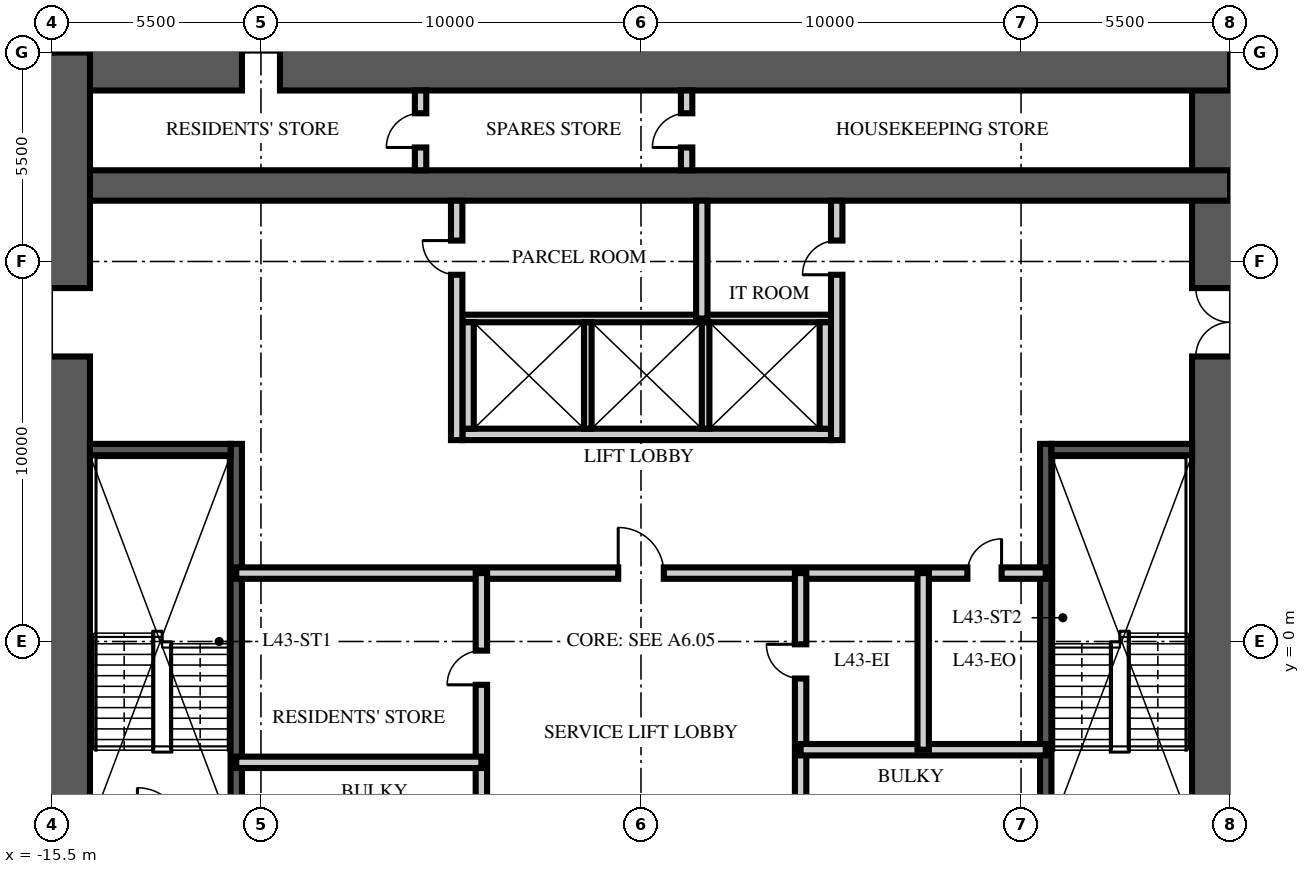
"""IFC4 building model, lengths in metres.
Left out: names, types, materials, properties, quantities, classifications, styles, units other than length and angle.
Written with IfcOpenShell. Run it as: python <this file> out.ifc"""

import sys

from ifc_helpers import new_model, si_unit, direction, frame, frame_2d, origin, place, context, subcontext, project, spatial, rectangle, extrude, element, fill, save


model = new_model("IFC4")
c1 = context("Model", 3, precision=1e-05, world=origin(), true_north=direction((0.0, 1.0)))
c2 = subcontext(c1, "Body", "Model", "MODEL_VIEW")
j1 = project(units=[si_unit("LENGTHUNIT", "METRE"), si_unit("PLANEANGLEUNIT", "RADIAN")], contexts=[c1])
p1 = place(None, origin())
s1 = spatial("IfcSite", under=j1, at=p1, CompositionType="ELEMENT")
p2 = place(p1, origin())
s2 = spatial("IfcBuilding", under=s1, at=p2, CompositionType="ELEMENT")
p3 = place(p2, frame((0.0, 0.0, 171.0)))
s3 = spatial("IfcBuildingStorey", under=s2, at=p3, CompositionType="ELEMENT", Elevation=171.0)
p4 = place(p3, frame((15.5, -15.5, -0.25), z_axis=(0.0, 0.0, 1.0), x_axis=(0.0, 1.0, 0.0)))
e1 = element("IfcWall", 1, at=p4, inside=s3, PredefinedType="SHEAR", context=c2, shape_type="SweptSolid", body=[
    extrude(rectangle(XDim=31.0, YDim=2.0, at=frame_2d((15.5, 0.0))), origin(), (0.0, 0.0, 1.0), 3.75),
])
p5 = place(p4, frame((6.5, 0.0, 0.25)))
e2 = element("IfcOpeningElement", 2, at=p5, cuts=e1, PredefinedType="OPENING", context=c2, shape_type="SweptSolid", body=[
    extrude(rectangle(XDim=1.2, YDim=2.1, at=frame_2d((0.6, 1.05))), frame((0.0, 1.01, 0.0), z_axis=(0.0, -1.0, 0.0), x_axis=(1.0, 0.0, 0.0)), (0.0, 0.0, 1.0), 2.02),
])
p6 = place(p4, frame((23.0, 0.0, 0.25)))
e3 = element("IfcOpeningElement", 3, at=p6, cuts=e1, PredefinedType="OPENING", context=c2, shape_type="SweptSolid", body=[
    extrude(rectangle(XDim=1.8, YDim=2.1, at=frame_2d((0.9, 1.05))), frame((0.0, 1.01, 0.0), z_axis=(0.0, -1.0, 0.0), x_axis=(1.0, 0.0, 0.0)), (0.0, 0.0, 1.0), 2.02),
])
p7 = place(p3, frame((-15.5, 15.5, -0.25), z_axis=(0.0, 0.0, 1.0), x_axis=(1.0, 0.0, 0.0)))
e4 = element("IfcWall", 4, at=p7, inside=s3, PredefinedType="SHEAR", context=c2, shape_type="SweptSolid", body=[
    extrude(rectangle(XDim=31.0, YDim=2.0, at=frame_2d((15.5, 0.0))), origin(), (0.0, 0.0, 1.0), 3.75),
])
p8 = place(p7, frame((5.0, 0.0, 0.25)))
e5 = element("IfcOpeningElement", 5, at=p8, cuts=e4, PredefinedType="OPENING", context=c2, shape_type="SweptSolid", body=[
    extrude(rectangle(XDim=1.0, YDim=2.1, at=frame_2d((0.5, 1.05))), frame((0.0, 1.01, 0.0), z_axis=(0.0, -1.0, 0.0), x_axis=(1.0, 0.0, 0.0)), (0.0, 0.0, 1.0), 2.02),
])
p9 = place(p3, frame((-15.5, 12.0, -0.25), z_axis=(0.0, 0.0, 1.0), x_axis=(1.0, 0.0, 0.0)))
e6 = element("IfcWall", 6, at=p9, inside=s3, PredefinedType="SHEAR", context=c2, shape_type="SweptSolid", body=[
    extrude(rectangle(XDim=31.0, YDim=0.8, at=frame_2d((15.5, 0.0))), origin(), (0.0, 0.0, 1.0), 3.75),
])
p10 = place(p3, frame((-15.5, -15.5, -0.25), z_axis=(0.0, 0.0, 1.0), x_axis=(0.0, 1.0, 0.0)))
e7 = element("IfcWall", 7, at=p10, inside=s3, PredefinedType="SHEAR", context=c2, shape_type="SweptSolid", body=[
    extrude(rectangle(XDim=31.0, YDim=2.0, at=frame_2d((15.5, 0.0))), origin(), (0.0, 0.0, 1.0), 3.75),
])
p11 = place(p10, frame((6.5, 0.0, 0.25)))
e8 = element("IfcOpeningElement", 8, at=p11, cuts=e7, PredefinedType="OPENING", context=c2, shape_type="SweptSolid", body=[
    extrude(rectangle(XDim=1.2, YDim=2.1, at=frame_2d((0.6, 1.05))), frame((0.0, 1.01, 0.0), z_axis=(0.0, -1.0, 0.0), x_axis=(1.0, 0.0, 0.0)), (0.0, 0.0, 1.0), 2.02),
])
p12 = place(p10, frame((23.0, 0.0, 0.25)))
e9 = element("IfcOpeningElement", 9, at=p12, cuts=e7, PredefinedType="OPENING", context=c2, shape_type="SweptSolid", body=[
    extrude(rectangle(XDim=1.8, YDim=2.1, at=frame_2d((0.9, 1.05))), frame((0.0, 1.01, 0.0), z_axis=(0.0, -1.0, 0.0), x_axis=(1.0, 0.0, 0.0)), (0.0, 0.0, 1.0), 2.02),
])
p13 = place(p3, frame((-10.65, -4.9, 0.0), z_axis=(0.0, 0.0, 1.0), x_axis=(0.0, 1.0, 0.0)))
e10 = element("IfcWall", 10, at=p13, inside=s3, PredefinedType="SOLIDWALL", context=c2, shape_type="SweptSolid", body=[
    extrude(rectangle(XDim=10.1, YDim=0.3, at=frame_2d((5.05, 0.0))), origin(), (0.0, 0.0, 1.0), 3.5),
])
p14 = place(p3, frame((-14.5, 5.05, 0.0), z_axis=(0.0, 0.0, 1.0), x_axis=(1.0, 0.0, 0.0)))
e11 = element("IfcWall", 11, at=p14, inside=s3, PredefinedType="SOLIDWALL", context=c2, shape_type="SweptSolid", body=[
    extrude(rectangle(XDim=3.7, YDim=0.3, at=frame_2d((1.85, 0.0))), origin(), (0.0, 0.0, 1.0), 3.5),
])
p15 = place(p3, frame((10.65, -4.9, 0.0), z_axis=(0.0, 0.0, 1.0), x_axis=(0.0, 1.0, 0.0)))
e12 = element("IfcWall", 12, at=p15, inside=s3, PredefinedType="SOLIDWALL", context=c2, shape_type="SweptSolid", body=[
    extrude(rectangle(XDim=10.1, YDim=0.3, at=frame_2d((5.05, 0.0))), origin(), (0.0, 0.0, 1.0), 3.5),
])
p16 = place(p3, frame((14.5, 5.05, 0.0), z_axis=(0.0, 0.0, 1.0), x_axis=(-1.0, 0.0, 0.0)))
e13 = element("IfcWall", 13, at=p16, inside=s3, PredefinedType="SOLIDWALL", context=c2, shape_type="SweptSolid", body=[
    extrude(rectangle(XDim=3.7, YDim=0.3, at=frame_2d((1.85, 0.0))), origin(), (0.0, 0.0, 1.0), 3.5),
])
p17 = place(p3, frame((-4.7, 5.45, 0.0), z_axis=(0.0, 0.0, 1.0), x_axis=(1.0, 0.0, 0.0)))
e14 = element("IfcWall", 14, at=p17, inside=s3, PredefinedType="PARTITIONING", context=c2, shape_type="SweptSolid", body=[
    extrude(rectangle(XDim=9.7, YDim=0.3, at=frame_2d((4.85, 0.0))), origin(), (0.0, 0.0, 1.0), 3.5),
])
p18 = place(p3, frame((-4.7, 8.5, 0.0), z_axis=(0.0, 0.0, 1.0), x_axis=(1.0, 0.0, 0.0)))
e15 = element("IfcWall", 15, at=p18, inside=s3, PredefinedType="PARTITIONING", context=c2, shape_type="SweptSolid", body=[
    extrude(rectangle(XDim=9.7, YDim=0.2, at=frame_2d((4.85, 0.0))), origin(), (0.0, 0.0, 1.0), 3.5),
])
for number, where, z_axis, x_axis in (
    (16, (-4.55, 5.6, 0.0), (0.0, 0.0, 1.0), (0.0, 1.0, 0.0)),
    (17, (4.85, 5.6, 0.0), (0.0, 0.0, 1.0), (0.0, 1.0, 0.0)),
):
    element("IfcWall", number, at=place(p3, frame(where, z_axis=z_axis, x_axis=x_axis)), inside=s3, PredefinedType="PARTITIONING", context=c2, shape_type="SweptSolid", body=[
        extrude(rectangle(XDim=2.8, YDim=0.3, at=frame_2d((1.4, 0.0))), origin(), (0.0, 0.0, 1.0), 3.5),
    ])
for number, where, z_axis, x_axis in (
    (18, (-1.4, 5.6, 0.0), (0.0, 0.0, 1.0), (0.0, 1.0, 0.0)),
    (19, (1.7, 5.6, 0.0), (0.0, 0.0, 1.0), (0.0, 1.0, 0.0)),
):
    element("IfcWall", number, at=place(p3, frame(where, z_axis=z_axis, x_axis=x_axis)), inside=s3, PredefinedType="PARTITIONING", context=c2, shape_type="SweptSolid", body=[
        extrude(rectangle(XDim=2.8, YDim=0.2, at=frame_2d((1.4, 0.0))), origin(), (0.0, 0.0, 1.0), 3.5),
    ])
p19 = place(p3, frame((-10.65, 1.8, 0.0), z_axis=(0.0, 0.0, 1.0), x_axis=(1.0, 0.0, 0.0)))
e20 = element("IfcWall", 20, at=p19, inside=s3, PredefinedType="PARTITIONING", context=c2, shape_type="SweptSolid", body=[
    extrude(rectangle(XDim=21.3, YDim=0.3, at=frame_2d((10.65, 0.0))), origin(), (0.0, 0.0, 1.0), 3.5),
])
p20 = place(p19, frame((10.05, 0.0, 0.0)))
e21 = element("IfcOpeningElement", 21, at=p20, cuts=e20, PredefinedType="OPENING", context=c2, shape_type="SweptSolid", body=[
    extrude(rectangle(XDim=1.2, YDim=2.1, at=frame_2d((0.6, 1.05))), frame((0.0, 0.16, 0.0), z_axis=(0.0, -1.0, 0.0), x_axis=(1.0, 0.0, 0.0)), (0.0, 0.0, 1.0), 0.32),
])
p21 = place(p19, frame((19.238, 0.0, 0.0)))
e22 = element("IfcOpeningElement", 22, at=p21, cuts=e20, PredefinedType="OPENING", context=c2, shape_type="SweptSolid", body=[
    extrude(rectangle(XDim=0.9, YDim=2.1, at=frame_2d((0.45, 1.05))), frame((0.0, 0.16, 0.0), z_axis=(0.0, -1.0, 0.0), x_axis=(1.0, 0.0, 0.0)), (0.0, 0.0, 1.0), 0.32),
])
p22 = place(p3, frame((-4.2, -6.65, 0.0), z_axis=(0.0, 0.0, 1.0), x_axis=(0.0, 1.0, 0.0)))
e23 = element("IfcWall", 23, at=p22, inside=s3, PredefinedType="PARTITIONING", context=c2, shape_type="SweptSolid", body=[
    extrude(rectangle(XDim=8.45, YDim=0.3, at=frame_2d((4.225, 0.0))), origin(), (0.0, 0.0, 1.0), 3.5),
])
p23 = place(p22, frame((1.285, 0.0, 0.0)))
e24 = element("IfcOpeningElement", 24, at=p23, cuts=e23, PredefinedType="OPENING", context=c2, shape_type="SweptSolid", body=[
    extrude(rectangle(XDim=0.9, YDim=2.1, at=frame_2d((0.45, 1.05))), frame((0.0, 0.16, 0.0), z_axis=(0.0, -1.0, 0.0), x_axis=(1.0, 0.0, 0.0)), (0.0, 0.0, 1.0), 0.32),
])
p24 = place(p22, frame((5.51, 0.0, 0.0)))
e25 = element("IfcOpeningElement", 25, at=p24, cuts=e23, PredefinedType="OPENING", context=c2, shape_type="SweptSolid", body=[
    extrude(rectangle(XDim=0.9, YDim=2.1, at=frame_2d((0.45, 1.05))), frame((0.0, 0.16, 0.0), z_axis=(0.0, -1.0, 0.0), x_axis=(1.0, 0.0, 0.0)), (0.0, 0.0, 1.0), 0.32),
])
p25 = place(p3, frame((4.2, -6.65, 0.0), z_axis=(0.0, 0.0, 1.0), x_axis=(0.0, 1.0, 0.0)))
e26 = element("IfcWall", 26, at=p25, inside=s3, PredefinedType="PARTITIONING", context=c2, shape_type="SweptSolid", body=[
    extrude(rectangle(XDim=8.45, YDim=0.3, at=frame_2d((4.225, 0.0))), origin(), (0.0, 0.0, 1.0), 3.5),
])
p26 = place(p25, frame((1.451, 0.0, 0.0)))
e27 = element("IfcOpeningElement", 27, at=p26, cuts=e26, PredefinedType="OPENING", context=c2, shape_type="SweptSolid", body=[
    extrude(rectangle(XDim=0.9, YDim=2.1, at=frame_2d((0.45, 1.05))), frame((0.0, 0.16, 0.0), z_axis=(0.0, -1.0, 0.0), x_axis=(1.0, 0.0, 0.0)), (0.0, 0.0, 1.0), 0.32),
])
p27 = place(p25, frame((5.676, 0.0, 0.0)))
e28 = element("IfcOpeningElement", 28, at=p27, cuts=e26, PredefinedType="OPENING", context=c2, shape_type="SweptSolid", body=[
    extrude(rectangle(XDim=0.9, YDim=2.1, at=frame_2d((0.45, 1.05))), frame((0.0, 0.16, 0.0), z_axis=(0.0, -1.0, 0.0), x_axis=(1.0, 0.0, 0.0)), (0.0, 0.0, 1.0), 0.32),
])
for number, where, z_axis, x_axis in (
    (29, (-10.65, -3.18, 0.0), (0.0, 0.0, 1.0), (1.0, 0.0, 0.0)),
    (30, (10.65, -2.848, 0.0), (0.0, 0.0, 1.0), (-1.0, 0.0, 0.0)),
):
    element("IfcWall", number, at=place(p3, frame(where, z_axis=z_axis, x_axis=x_axis)), inside=s3, PredefinedType="PARTITIONING", context=c2, shape_type="SweptSolid", body=[
        extrude(rectangle(XDim=6.45, YDim=0.3, at=frame_2d((3.225, 0.0))), origin(), (0.0, 0.0, 1.0), 3.5),
    ])
p28 = place(p3, frame((7.425, -2.848, 0.0), z_axis=(0.0, 0.0, 1.0), x_axis=(0.0, 1.0, 0.0)))
e31 = element("IfcWall", 31, at=p28, inside=s3, PredefinedType="PARTITIONING", context=c2, shape_type="SweptSolid", body=[
    extrude(rectangle(XDim=4.648, YDim=0.3, at=frame_2d((2.324, 0.0))), origin(), (0.0, 0.0, 1.0), 3.5),
])
p29 = place(p3, frame((-4.85, 5.3, 0.0), z_axis=(0.0, 0.0, 1.0), x_axis=(0.0, 1.0, 0.0)))
e32 = element("IfcWall", 32, at=p29, inside=s3, PredefinedType="PARTITIONING", context=c2, shape_type="SweptSolid", body=[
    extrude(rectangle(XDim=6.3, YDim=0.3, at=frame_2d((3.15, 0.0))), origin(), (0.0, 0.0, 1.0), 3.5),
])
p30 = place(p29, frame((4.35, 0.0, 0.0)))
e33 = element("IfcOpeningElement", 33, at=p30, cuts=e32, PredefinedType="OPENING", context=c2, shape_type="SweptSolid", body=[
    extrude(rectangle(XDim=0.9, YDim=2.1, at=frame_2d((0.45, 1.05))), frame((0.0, 0.16, 0.0), z_axis=(0.0, -1.0, 0.0), x_axis=(1.0, 0.0, 0.0)), (0.0, 0.0, 1.0), 0.32),
])
p31 = place(p3, frame((5.15, 5.3, 0.0), z_axis=(0.0, 0.0, 1.0), x_axis=(0.0, 1.0, 0.0)))
e34 = element("IfcWall", 34, at=p31, inside=s3, PredefinedType="PARTITIONING", context=c2, shape_type="SweptSolid", body=[
    extrude(rectangle(XDim=6.3, YDim=0.3, at=frame_2d((3.15, 0.0))), origin(), (0.0, 0.0, 1.0), 3.5),
])
p32 = place(p31, frame((4.35, 0.0, 0.0)))
e35 = element("IfcOpeningElement", 35, at=p32, cuts=e34, PredefinedType="OPENING", context=c2, shape_type="SweptSolid", body=[
    extrude(rectangle(XDim=0.9, YDim=2.1, at=frame_2d((0.45, 1.05))), frame((0.0, 0.16, 0.0), z_axis=(0.0, -1.0, 0.0), x_axis=(1.0, 0.0, 0.0)), (0.0, 0.0, 1.0), 0.32),
])
p33 = place(p3, frame((1.6, 8.5, 0.0), z_axis=(0.0, 0.0, 1.0), x_axis=(0.0, 1.0, 0.0)))
e36 = element("IfcWall", 36, at=p33, inside=s3, PredefinedType="PARTITIONING", context=c2, shape_type="SweptSolid", body=[
    extrude(rectangle(XDim=3.1, YDim=0.3, at=frame_2d((1.55, 0.0))), origin(), (0.0, 0.0, 1.0), 3.5),
])
p34 = place(p3, frame((-5.8, 12.4, 0.0), z_axis=(0.0, 0.0, 1.0), x_axis=(0.0, 1.0, 0.0)))
e37 = element("IfcWall", 37, at=p34, inside=s3, PredefinedType="PARTITIONING", context=c2, shape_type="SweptSolid", body=[
    extrude(rectangle(XDim=2.1, YDim=0.3, at=frame_2d((1.05, 0.0))), origin(), (0.0, 0.0, 1.0), 3.5),
])
p35 = place(p34, frame((0.6, 0.0, 0.0)))
e38 = element("IfcOpeningElement", 38, at=p35, cuts=e37, PredefinedType="OPENING", context=c2, shape_type="SweptSolid", body=[
    extrude(rectangle(XDim=0.9, YDim=2.1, at=frame_2d((0.45, 1.05))), frame((0.0, 0.16, 0.0), z_axis=(0.0, -1.0, 0.0), x_axis=(1.0, 0.0, 0.0)), (0.0, 0.0, 1.0), 0.32),
])
p36 = place(p3, frame((1.2, 12.4, 0.0), z_axis=(0.0, 0.0, 1.0), x_axis=(0.0, 1.0, 0.0)))
e39 = element("IfcWall", 39, at=p36, inside=s3, PredefinedType="PARTITIONING", context=c2, shape_type="SweptSolid", body=[
    extrude(rectangle(XDim=2.1, YDim=0.3, at=frame_2d((1.05, 0.0))), origin(), (0.0, 0.0, 1.0), 3.5),
])
p37 = place(p36, frame((0.6, 0.0, 0.0)))
e40 = element("IfcOpeningElement", 40, at=p37, cuts=e39, PredefinedType="OPENING", context=c2, shape_type="SweptSolid", body=[
    extrude(rectangle(XDim=0.9, YDim=2.1, at=frame_2d((0.45, 1.05))), frame((0.0, 0.16, 0.0), z_axis=(0.0, -1.0, 0.0), x_axis=(1.0, 0.0, 0.0)), (0.0, 0.0, 1.0), 0.32),
])
p38 = place(p12, origin())
e41 = element("IfcDoor", 41, at=p38, inside=s3, OperationType="DOUBLE_DOOR_SINGLE_SWING", PredefinedType="DOOR", context=c2, shape_type="SweptSolid", body=[
    extrude(rectangle(XDim=1.8, YDim=2.1, at=frame_2d((0.9, 1.05))), frame((0.0, 0.025, 0.0), z_axis=(0.0, -1.0, 0.0), x_axis=(1.0, 0.0, 0.0)), (0.0, 0.0, 1.0), 0.05),
])
fill(e9, e41)
p39 = place(p6, origin())
e42 = element("IfcDoor", 42, at=p39, inside=s3, OperationType="DOUBLE_DOOR_SINGLE_SWING", PredefinedType="DOOR", context=c2, shape_type="SweptSolid", body=[
    extrude(rectangle(XDim=1.8, YDim=2.1, at=frame_2d((0.9, 1.05))), frame((0.0, 0.025, 0.0), z_axis=(0.0, -1.0, 0.0), x_axis=(1.0, 0.0, 0.0)), (0.0, 0.0, 1.0), 0.05),
])
fill(e3, e42)
p40 = place(p20, origin())
e43 = element("IfcDoor", 43, at=p40, inside=s3, OperationType="SINGLE_SWING_LEFT", PredefinedType="DOOR", context=c2, shape_type="SweptSolid", body=[
    extrude(rectangle(XDim=1.2, YDim=2.1, at=frame_2d((0.6, 1.05))), frame((0.0, 0.025, 0.0), z_axis=(0.0, -1.0, 0.0), x_axis=(1.0, 0.0, 0.0)), (0.0, 0.0, 1.0), 0.05),
])
fill(e21, e43)
p41 = place(p24, origin())
e44 = element("IfcDoor", 44, at=p41, inside=s3, OperationType="SINGLE_SWING_LEFT", PredefinedType="DOOR", context=c2, shape_type="SweptSolid", body=[
    extrude(rectangle(XDim=0.9, YDim=2.1, at=frame_2d((0.45, 1.05))), frame((0.0, 0.025, 0.0), z_axis=(0.0, -1.0, 0.0), x_axis=(1.0, 0.0, 0.0)), (0.0, 0.0, 1.0), 0.05),
])
fill(e25, e44)
p42 = place(p27, origin())
e45 = element("IfcDoor", 45, at=p42, inside=s3, OperationType="SINGLE_SWING_RIGHT", PredefinedType="DOOR", context=c2, shape_type="SweptSolid", body=[
    extrude(rectangle(XDim=0.9, YDim=2.1, at=frame_2d((0.45, 1.05))), frame((0.0, 0.025, 0.0), z_axis=(0.0, -1.0, 0.0), x_axis=(1.0, 0.0, 0.0)), (0.0, 0.0, 1.0), 0.05),
])
fill(e28, e45)
p43 = place(p21, origin())
e46 = element("IfcDoor", 46, at=p43, inside=s3, OperationType="SINGLE_SWING_RIGHT", PredefinedType="DOOR", context=c2, shape_type="SweptSolid", body=[
    extrude(rectangle(XDim=0.9, YDim=2.1, at=frame_2d((0.45, 1.05))), frame((0.0, 0.025, 0.0), z_axis=(0.0, -1.0, 0.0), x_axis=(1.0, 0.0, 0.0)), (0.0, 0.0, 1.0), 0.05),
])
fill(e22, e46)
p44 = place(p30, origin())
e47 = element("IfcDoor", 47, at=p44, inside=s3, OperationType="SINGLE_SWING_RIGHT", PredefinedType="DOOR", context=c2, shape_type="SweptSolid", body=[
    extrude(rectangle(XDim=0.9, YDim=2.1, at=frame_2d((0.45, 1.05))), frame((0.0, 0.025, 0.0), z_axis=(0.0, -1.0, 0.0), x_axis=(1.0, 0.0, 0.0)), (0.0, 0.0, 1.0), 0.05),
])
fill(e33, e47)
p45 = place(p32, origin())
e48 = element("IfcDoor", 48, at=p45, inside=s3, OperationType="SINGLE_SWING_LEFT", PredefinedType="DOOR", context=c2, shape_type="SweptSolid", body=[
    extrude(rectangle(XDim=0.9, YDim=2.1, at=frame_2d((0.45, 1.05))), frame((0.0, 0.025, 0.0), z_axis=(0.0, -1.0, 0.0), x_axis=(1.0, 0.0, 0.0)), (0.0, 0.0, 1.0), 0.05),
])
fill(e35, e48)
p46 = place(p35, origin())
e49 = element("IfcDoor", 49, at=p46, inside=s3, OperationType="SINGLE_SWING_LEFT", PredefinedType="DOOR", context=c2, shape_type="SweptSolid", body=[
    extrude(rectangle(XDim=0.9, YDim=2.1, at=frame_2d((0.45, 1.05))), frame((0.0, 0.025, 0.0), z_axis=(0.0, -1.0, 0.0), x_axis=(1.0, 0.0, 0.0)), (0.0, 0.0, 1.0), 0.05),
])
fill(e38, e49)
p47 = place(p37, origin())
e50 = element("IfcDoor", 50, at=p47, inside=s3, OperationType="SINGLE_SWING_LEFT", PredefinedType="DOOR", context=c2, shape_type="SweptSolid", body=[
    extrude(rectangle(XDim=0.9, YDim=2.1, at=frame_2d((0.45, 1.05))), frame((0.0, 0.025, 0.0), z_axis=(0.0, -1.0, 0.0), x_axis=(1.0, 0.0, 0.0)), (0.0, 0.0, 1.0), 0.05),
])
fill(e40, e50)
p48 = place(p8, origin())
e51 = element("IfcDoor", 51, at=p48, inside=s3, OperationType="SINGLE_SWING_RIGHT", PredefinedType="DOOR", context=c2, shape_type="SweptSolid", body=[
    extrude(rectangle(XDim=1.0, YDim=2.1, at=frame_2d((0.5, 1.05))), frame((0.0, 0.025, 0.0), z_axis=(0.0, -1.0, 0.0), x_axis=(1.0, 0.0, 0.0)), (0.0, 0.0, 1.0), 0.05),
])
fill(e5, e51)
save(model, sys.argv[1])
